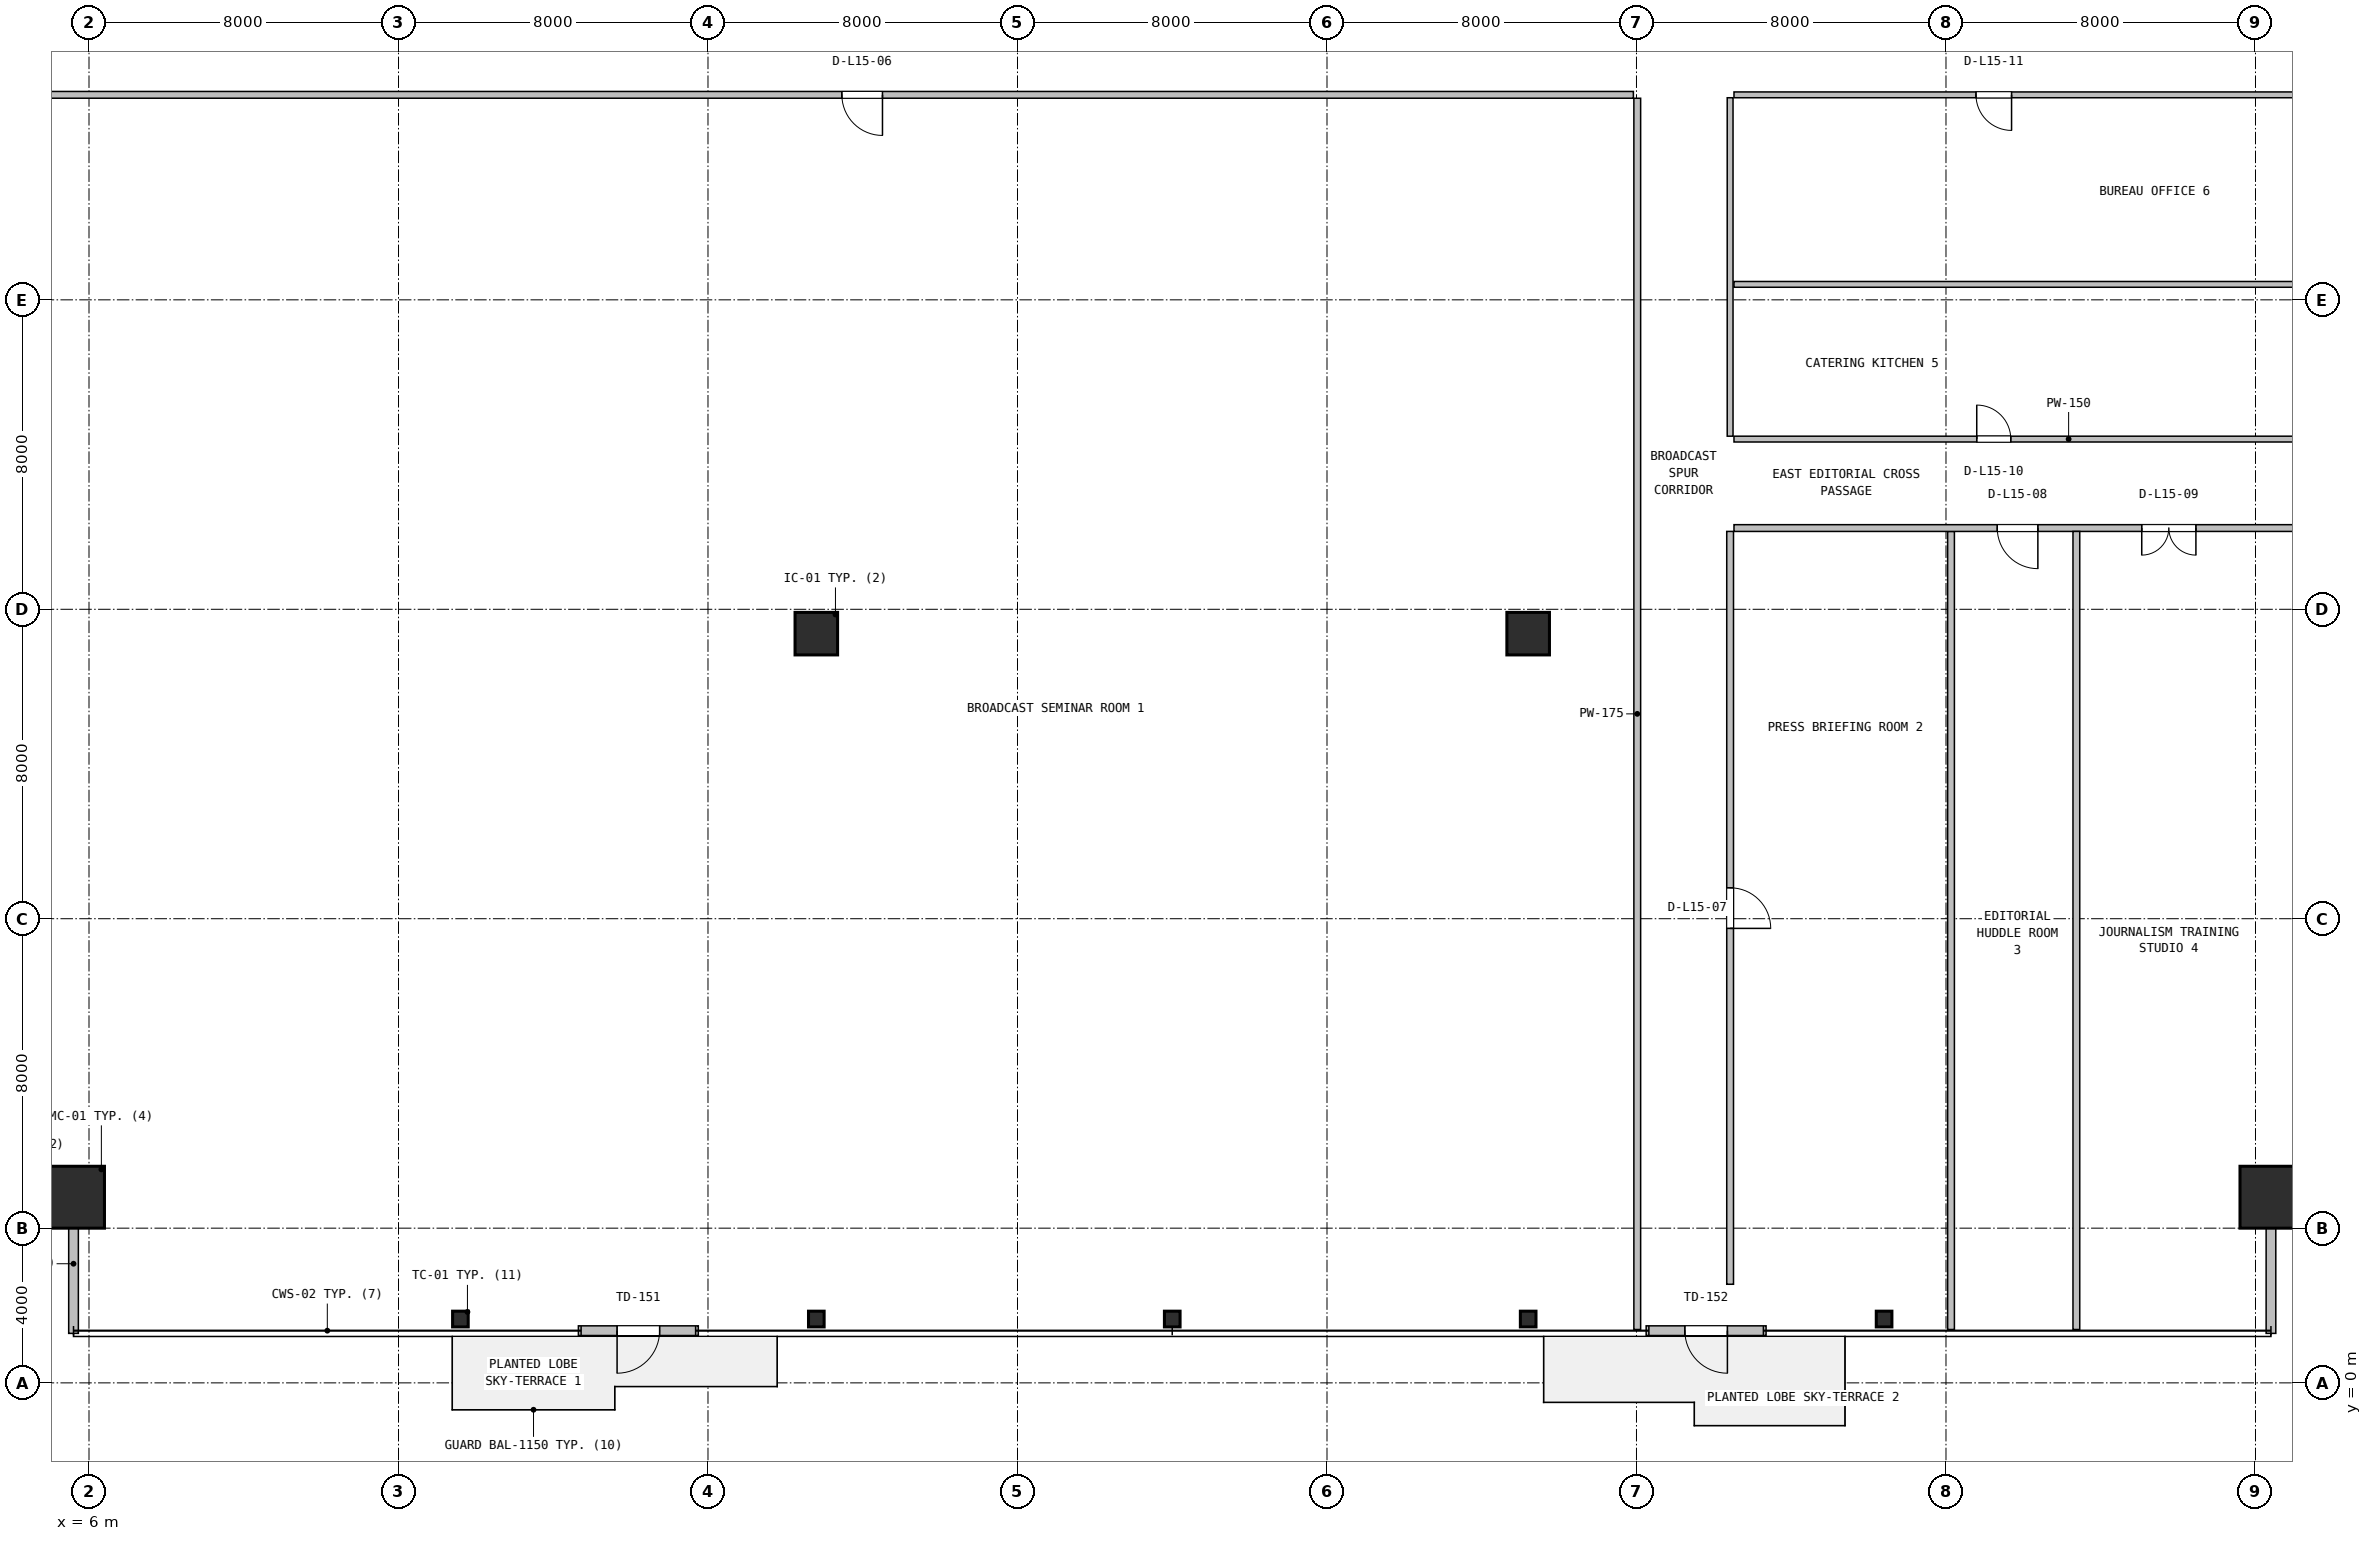
"""IFC4 building model, lengths in metres.
Left out: names, types, materials, properties, quantities, classifications, styles, units other than length and angle.
Written with IfcOpenShell. Run it as: python <this file> out.ifc"""

import sys

from ifc_helpers import new_model, si_unit, direction, frame, frame_2d, origin, origin_2d, place, context, subcontext, project, spatial, rectangle, hollow_rectangle, i_section, extrude, source, transform, mapped, element, fill, save


model = new_model("IFC4")
c1 = context("Model", 3, precision=1e-05, world=origin(), true_north=direction((0.0, 1.0)))
c2 = subcontext(c1, "Body", "Model", "MODEL_VIEW")
j1 = project(units=[si_unit("LENGTHUNIT", "METRE"), si_unit("PLANEANGLEUNIT", "RADIAN")], contexts=[c1])
p1 = place(None, origin())
s1 = spatial("IfcSite", under=j1, at=p1, CompositionType="ELEMENT")
p2 = place(p1, origin())
s2 = spatial("IfcBuilding", under=s1, at=p2, CompositionType="ELEMENT")
p3 = place(p2, frame((0.0, 0.0, 66.6)))
s3 = spatial("IfcBuildingStorey", under=s2, at=p3, CompositionType="ELEMENT", Elevation=66.6)
m1 = source(origin(), c2, "Body", "SweptSolid", [
    extrude(hollow_rectangle(XDim=1.6, YDim=1.6, WallThickness=0.06, at=origin_2d()), origin(), (0.0, 0.0, 1.0), 3.9),
])
for number, where, z_axis, x_axis in (
    (1, (5.6, 4.8, 0.0), (0.0, 0.0, 1.0), (1.0, 0.0, 0.0)),
    (2, (62.4, 4.8, 0.0), (0.0, 0.0, 1.0), (1.0, 0.0, 0.0)),
):
    element("IfcColumn", number, at=place(p3, frame(where, z_axis=z_axis, x_axis=x_axis)), inside=s3, PredefinedType="COLUMN", context=c2, shape_type="MappedRepresentation", body=[
        mapped(m1, transform((0.0, 0.0, 0.0), x_axis=(1.0, 0.0, 0.0), y_axis=(0.0, 1.0, 0.0), z_axis=(0.0, 0.0, 1.0), scale=1.0)),
    ])
m2 = source(origin(), c2, "Body", "SweptSolid", [
    extrude(i_section(OverallWidth=0.404, OverallDepth=0.407, WebThickness=0.027, FlangeThickness=0.044, FilletRadius=0.018, at=origin_2d()), origin(), (0.0, 0.0, 1.0), 3.9),
])
for number, where, z_axis, x_axis in (
    (3, (15.6, 1.65, 0.0), (0.0, 0.0, 1.0), (1.0, 0.0, 0.0)),
    (4, (24.8, 1.65, 0.0), (0.0, 0.0, 1.0), (1.0, 0.0, 0.0)),
    (5, (34.0, 1.65, 0.0), (0.0, 0.0, 1.0), (1.0, 0.0, 0.0)),
    (6, (43.2, 1.65, 0.0), (0.0, 0.0, 1.0), (1.0, 0.0, 0.0)),
    (7, (52.4, 1.65, 0.0), (0.0, 0.0, 1.0), (1.0, 0.0, 0.0)),
):
    element("IfcColumn", number, at=place(p3, frame(where, z_axis=z_axis, x_axis=x_axis)), inside=s3, PredefinedType="COLUMN", context=c2, shape_type="MappedRepresentation", body=[
        mapped(m2, transform((0.0, 0.0, 0.0), x_axis=(1.0, 0.0, 0.0), y_axis=(0.0, 1.0, 0.0), z_axis=(0.0, 0.0, 1.0), scale=1.0)),
    ])
m3 = source(origin(), c2, "Body", "SweptSolid", [
    extrude(rectangle(XDim=1.1, YDim=1.1, at=origin_2d()), origin(), (0.0, 0.0, 1.0), 3.9),
])
for number, where, z_axis, x_axis in (
    (8, (24.8, 19.37, 0.0), (0.0, 0.0, 1.0), (1.0, 0.0, 0.0)),
    (9, (43.2, 19.37, 0.0), (0.0, 0.0, 1.0), (1.0, 0.0, 0.0)),
):
    element("IfcColumn", number, at=place(p3, frame(where, z_axis=z_axis, x_axis=x_axis)), inside=s3, PredefinedType="COLUMN", context=c2, shape_type="MappedRepresentation", body=[
        mapped(m3, transform((0.0, 0.0, 0.0), x_axis=(1.0, 0.0, 0.0), y_axis=(0.0, 1.0, 0.0), z_axis=(0.0, 0.0, 1.0), scale=1.0)),
    ])
p4 = place(p3, frame((18.65, 1.35, 0.0), z_axis=(0.0, 0.0, 1.0), x_axis=(1.0, 0.0, 0.0)))
e10 = element("IfcWall", 10, at=p4, inside=s3, PredefinedType="SOLIDWALL", context=c2, shape_type="SweptSolid", body=[
    extrude(rectangle(XDim=3.1, YDim=0.25, at=frame_2d((1.55, 0.0))), origin(), (0.0, 0.0, 1.0), 3.63),
])
p5 = place(p4, frame((1.0, 0.0, 0.0)))
e11 = element("IfcOpeningElement", 11, at=p5, cuts=e10, PredefinedType="OPENING", context=c2, shape_type="SweptSolid", body=[
    extrude(rectangle(XDim=1.1, YDim=2.15, at=frame_2d((0.55, 1.075))), frame((0.0, 0.135, 0.0), z_axis=(0.0, -1.0, 0.0), x_axis=(1.0, 0.0, 0.0)), (0.0, 0.0, 1.0), 0.27),
])
p6 = place(p3, frame((46.25, 1.35, 0.0), z_axis=(0.0, 0.0, 1.0), x_axis=(1.0, 0.0, 0.0)))
e12 = element("IfcWall", 12, at=p6, inside=s3, PredefinedType="SOLIDWALL", context=c2, shape_type="SweptSolid", body=[
    extrude(rectangle(XDim=3.1, YDim=0.25, at=frame_2d((1.55, 0.0))), origin(), (0.0, 0.0, 1.0), 3.63),
])
p7 = place(p6, frame((1.0, 0.0, 0.0)))
e13 = element("IfcOpeningElement", 13, at=p7, cuts=e12, PredefinedType="OPENING", context=c2, shape_type="SweptSolid", body=[
    extrude(rectangle(XDim=1.1, YDim=2.15, at=frame_2d((0.55, 1.075))), frame((0.0, 0.135, 0.0), z_axis=(0.0, -1.0, 0.0), x_axis=(1.0, 0.0, 0.0)), (0.0, 0.0, 1.0), 0.27),
])
for number, where, z_axis, x_axis in (
    (14, (5.6, 1.28, 0.0), (0.0, 0.0, 1.0), (0.0, 1.0, 0.0)),
    (15, (62.4, 1.28, 0.0), (0.0, 0.0, 1.0), (0.0, 1.0, 0.0)),
):
    element("IfcWall", number, at=place(p3, frame(where, z_axis=z_axis, x_axis=x_axis)), inside=s3, PredefinedType="SOLIDWALL", context=c2, shape_type="SweptSolid", body=[
        extrude(rectangle(XDim=3.6, YDim=0.25, at=frame_2d((1.8, 0.0))), origin(), (0.0, 0.0, 1.0), 3.208),
    ])
p8 = place(p3, frame((46.02, 1.38, 0.0), z_axis=(0.0, 0.0, 1.0), x_axis=(0.0, 1.0, 0.0)))
e16 = element("IfcWall", 16, at=p8, inside=s3, PredefinedType="PARTITIONING", context=c2, shape_type="SweptSolid", body=[
    extrude(rectangle(XDim=31.832, YDim=0.175, at=frame_2d((15.916, 0.0))), origin(), (0.0, 0.0, 1.0), 3.208),
])
p9 = place(p3, frame((2.18, 33.3, 0.0), z_axis=(0.0, 0.0, 1.0), x_axis=(1.0, 0.0, 0.0)))
e17 = element("IfcWall", 17, at=p9, inside=s3, PredefinedType="PARTITIONING", context=c2, shape_type="SweptSolid", body=[
    extrude(rectangle(XDim=43.74, YDim=0.175, at=frame_2d((21.87, 0.0))), origin(), (0.0, 0.0, 1.0), 2.852),
])
p10 = place(p9, frame((23.28, 0.0, 0.0)))
e18 = element("IfcOpeningElement", 18, at=p10, cuts=e17, PredefinedType="OPENING", context=c2, shape_type="SweptSolid", body=[
    extrude(rectangle(XDim=1.05, YDim=2.1, at=frame_2d((0.525, 1.05))), frame((0.0, 0.098, 0.0), z_axis=(0.0, -1.0, 0.0), x_axis=(1.0, 0.0, 0.0)), (0.0, 0.0, 1.0), 0.195),
])
p11 = place(p3, frame((54.13, 1.38, 0.0), z_axis=(0.0, 0.0, 1.0), x_axis=(0.0, 1.0, 0.0)))
e19 = element("IfcWall", 19, at=p11, inside=s3, PredefinedType="PARTITIONING", context=c2, shape_type="SweptSolid", body=[
    extrude(rectangle(XDim=20.633, YDim=0.175, at=frame_2d((10.316, 0.0))), origin(), (0.0, 0.0, 1.0), 3.208),
])
p12 = place(p3, frame((48.52, 22.1, 0.0), z_axis=(0.0, 0.0, 1.0), x_axis=(1.0, 0.0, 0.0)))
e20 = element("IfcWall", 20, at=p12, inside=s3, PredefinedType="PARTITIONING", context=c2, shape_type="SweptSolid", body=[
    extrude(rectangle(XDim=17.3, YDim=0.175, at=frame_2d((8.65, 0.0))), origin(), (0.0, 0.0, 1.0), 3.208),
])
p13 = place(p12, frame((6.805, 0.0, 0.0)))
e21 = element("IfcOpeningElement", 21, at=p13, cuts=e20, PredefinedType="OPENING", context=c2, shape_type="SweptSolid", body=[
    extrude(rectangle(XDim=1.05, YDim=2.1, at=frame_2d((0.525, 1.05))), frame((0.0, 0.098, 0.0), z_axis=(0.0, -1.0, 0.0), x_axis=(1.0, 0.0, 0.0)), (0.0, 0.0, 1.0), 0.195),
])
p14 = place(p12, frame((10.54, 0.0, 0.0)))
e22 = element("IfcOpeningElement", 22, at=p14, cuts=e20, PredefinedType="OPENING", context=c2, shape_type="SweptSolid", body=[
    extrude(rectangle(XDim=1.4, YDim=2.12, at=frame_2d((0.7, 1.06))), frame((0.0, 0.098, 0.0), z_axis=(0.0, -1.0, 0.0), x_axis=(1.0, 0.0, 0.0)), (0.0, 0.0, 1.0), 0.195),
])
p15 = place(p3, frame((48.42, 2.55, 0.0), z_axis=(0.0, 0.0, 1.0), x_axis=(0.0, 1.0, 0.0)))
e23 = element("IfcWall", 23, at=p15, inside=s3, PredefinedType="PARTITIONING", context=c2, shape_type="SweptSolid", body=[
    extrude(rectangle(XDim=19.463, YDim=0.175, at=frame_2d((9.731, 0.0))), origin(), (0.0, 0.0, 1.0), 3.322),
])
p16 = place(p15, frame((9.2, 0.0, 0.0)))
e24 = element("IfcOpeningElement", 24, at=p16, cuts=e23, PredefinedType="OPENING", context=c2, shape_type="SweptSolid", body=[
    extrude(rectangle(XDim=1.05, YDim=2.1, at=frame_2d((0.525, 1.05))), frame((0.0, 0.098, 0.0), z_axis=(0.0, -1.0, 0.0), x_axis=(1.0, 0.0, 0.0)), (0.0, 0.0, 1.0), 0.195),
])
p17 = place(p3, frame((57.37, 1.38, 0.0), z_axis=(0.0, 0.0, 1.0), x_axis=(0.0, 1.0, 0.0)))
e25 = element("IfcWall", 25, at=p17, inside=s3, PredefinedType="PARTITIONING", context=c2, shape_type="SweptSolid", body=[
    extrude(rectangle(XDim=20.633, YDim=0.175, at=frame_2d((10.316, 0.0))), origin(), (0.0, 0.0, 1.0), 3.208),
])
p18 = place(p3, frame((48.52, 24.4, 0.0), z_axis=(0.0, 0.0, 1.0), x_axis=(1.0, 0.0, 0.0)))
e26 = element("IfcWall", 26, at=p18, inside=s3, PredefinedType="PARTITIONING", context=c2, shape_type="SweptSolid", body=[
    extrude(rectangle(XDim=17.3, YDim=0.15, at=frame_2d((8.65, 0.0))), origin(), (0.0, 0.0, 1.0), 3.208),
])
p19 = place(p18, frame((6.275, 0.0, 0.0)))
e27 = element("IfcOpeningElement", 27, at=p19, cuts=e26, PredefinedType="OPENING", context=c2, shape_type="SweptSolid", body=[
    extrude(rectangle(XDim=0.88, YDim=2.06, at=frame_2d((0.44, 1.03))), frame((0.0, 0.085, 0.0), z_axis=(0.0, -1.0, 0.0), x_axis=(1.0, 0.0, 0.0)), (0.0, 0.0, 1.0), 0.17),
])
p20 = place(p3, frame((48.52, 28.4, 0.0), z_axis=(0.0, 0.0, 1.0), x_axis=(1.0, 0.0, 0.0)))
e28 = element("IfcWall", 28, at=p20, inside=s3, PredefinedType="PARTITIONING", context=c2, shape_type="SweptSolid", body=[
    extrude(rectangle(XDim=17.3, YDim=0.15, at=frame_2d((8.65, 0.0))), origin(), (0.0, 0.0, 1.0), 3.208),
])
p21 = place(p3, frame((48.42, 24.475, 0.0), z_axis=(0.0, 0.0, 1.0), x_axis=(0.0, 1.0, 0.0)))
e29 = element("IfcWall", 29, at=p21, inside=s3, PredefinedType="PARTITIONING", context=c2, shape_type="SweptSolid", body=[
    extrude(rectangle(XDim=8.75, YDim=0.15, at=frame_2d((4.375, 0.0))), origin(), (0.0, 0.0, 1.0), 3.378),
])
p22 = place(p3, frame((48.52, 33.3, 0.0), z_axis=(0.0, 0.0, 1.0), x_axis=(1.0, 0.0, 0.0)))
e30 = element("IfcWall", 30, at=p22, inside=s3, PredefinedType="PARTITIONING", context=c2, shape_type="SweptSolid", body=[
    extrude(rectangle(XDim=17.3, YDim=0.15, at=frame_2d((8.65, 0.0))), origin(), (0.0, 0.0, 1.0), 3.208),
])
p23 = place(p22, frame((6.255, 0.0, 0.0)))
e31 = element("IfcOpeningElement", 31, at=p23, cuts=e30, PredefinedType="OPENING", context=c2, shape_type="SweptSolid", body=[
    extrude(rectangle(XDim=0.92, YDim=2.08, at=frame_2d((0.46, 1.04))), frame((0.0, 0.085, 0.0), z_axis=(0.0, -1.0, 0.0), x_axis=(1.0, 0.0, 0.0)), (0.0, 0.0, 1.0), 0.17),
])
m4 = source(origin(), c2, "Body", "SweptSolid", [
    extrude(rectangle(XDim=1.1, YDim=2.15, at=frame_2d((0.55, 1.075))), frame((0.0, 0.025, 0.0), z_axis=(0.0, -1.0, 0.0), x_axis=(1.0, 0.0, 0.0)), (0.0, 0.0, 1.0), 0.05),
])
p24 = place(p5, frame((1.1, 0.0, 0.0), z_axis=(0.0, 0.0, 1.0), x_axis=(-1.0, 0.0, 0.0)))
e32 = element("IfcDoor", 32, at=p24, inside=s3, OperationType="SINGLE_SWING_LEFT", PredefinedType="DOOR", context=c2, shape_type="MappedRepresentation", body=[
    mapped(m4, transform((0.0, 0.0, 0.0), x_axis=(1.0, 0.0, 0.0), y_axis=(0.0, 1.0, 0.0), z_axis=(0.0, 0.0, 1.0), scale=1.0)),
])
fill(e11, e32)
p25 = place(p7, frame((1.1, 0.0, 0.0), z_axis=(0.0, 0.0, 1.0), x_axis=(-1.0, 0.0, 0.0)))
e33 = element("IfcDoor", 33, at=p25, inside=s3, OperationType="SINGLE_SWING_RIGHT", PredefinedType="DOOR", context=c2, shape_type="MappedRepresentation", body=[
    mapped(m4, transform((0.0, 0.0, 0.0), x_axis=(1.0, 0.0, 0.0), y_axis=(0.0, 1.0, 0.0), z_axis=(0.0, 0.0, 1.0), scale=1.0)),
])
fill(e13, e33)
m5 = source(origin(), c2, "Body", "SweptSolid", [
    extrude(rectangle(XDim=1.05, YDim=2.1, at=frame_2d((0.525, 1.05))), frame((0.0, 0.025, 0.0), z_axis=(0.0, -1.0, 0.0), x_axis=(1.0, 0.0, 0.0)), (0.0, 0.0, 1.0), 0.05),
])
p26 = place(p10, frame((1.05, 0.0, 0.0), z_axis=(0.0, 0.0, 1.0), x_axis=(-1.0, 0.0, 0.0)))
e34 = element("IfcDoor", 34, at=p26, inside=s3, OperationType="SINGLE_SWING_RIGHT", PredefinedType="DOOR", context=c2, shape_type="MappedRepresentation", body=[
    mapped(m5, transform((0.0, 0.0, 0.0), x_axis=(1.0, 0.0, 0.0), y_axis=(0.0, 1.0, 0.0), z_axis=(0.0, 0.0, 1.0), scale=1.0)),
])
fill(e18, e34)
p27 = place(p16, frame((1.05, 0.0, 0.0), z_axis=(0.0, 0.0, 1.0), x_axis=(-1.0, 0.0, 0.0)))
e35 = element("IfcDoor", 35, at=p27, inside=s3, OperationType="SINGLE_SWING_LEFT", PredefinedType="DOOR", context=c2, shape_type="MappedRepresentation", body=[
    mapped(m5, transform((0.0, 0.0, 0.0), x_axis=(1.0, 0.0, 0.0), y_axis=(0.0, 1.0, 0.0), z_axis=(0.0, 0.0, 1.0), scale=1.0)),
])
fill(e24, e35)
p28 = place(p13, frame((1.05, 0.0, 0.0), z_axis=(0.0, 0.0, 1.0), x_axis=(-1.0, 0.0, 0.0)))
e36 = element("IfcDoor", 36, at=p28, inside=s3, OperationType="SINGLE_SWING_RIGHT", PredefinedType="DOOR", context=c2, shape_type="MappedRepresentation", body=[
    mapped(m5, transform((0.0, 0.0, 0.0), x_axis=(1.0, 0.0, 0.0), y_axis=(0.0, 1.0, 0.0), z_axis=(0.0, 0.0, 1.0), scale=1.0)),
])
fill(e21, e36)
m6 = source(origin(), c2, "Body", "SweptSolid", [
    extrude(rectangle(XDim=1.4, YDim=2.12, at=frame_2d((0.7, 1.06))), frame((0.0, 0.025, 0.0), z_axis=(0.0, -1.0, 0.0), x_axis=(1.0, 0.0, 0.0)), (0.0, 0.0, 1.0), 0.05),
])
p29 = place(p14, frame((1.4, 0.0, 0.0), z_axis=(0.0, 0.0, 1.0), x_axis=(-1.0, 0.0, 0.0)))
e37 = element("IfcDoor", 37, at=p29, inside=s3, OperationType="DOUBLE_DOOR_SINGLE_SWING", PredefinedType="DOOR", context=c2, shape_type="MappedRepresentation", body=[
    mapped(m6, transform((0.0, 0.0, 0.0), x_axis=(1.0, 0.0, 0.0), y_axis=(0.0, 1.0, 0.0), z_axis=(0.0, 0.0, 1.0), scale=1.0)),
])
fill(e22, e37)
m7 = source(origin(), c2, "Body", "SweptSolid", [
    extrude(rectangle(XDim=0.88, YDim=2.06, at=frame_2d((0.44, 1.03))), frame((0.0, 0.025, 0.0), z_axis=(0.0, -1.0, 0.0), x_axis=(1.0, 0.0, 0.0)), (0.0, 0.0, 1.0), 0.05),
])
p30 = place(p19, origin())
e38 = element("IfcDoor", 38, at=p30, inside=s3, OperationType="SINGLE_SWING_LEFT", PredefinedType="DOOR", context=c2, shape_type="MappedRepresentation", body=[
    mapped(m7, transform((0.0, 0.0, 0.0), x_axis=(1.0, 0.0, 0.0), y_axis=(0.0, 1.0, 0.0), z_axis=(0.0, 0.0, 1.0), scale=1.0)),
])
fill(e27, e38)
m8 = source(origin(), c2, "Body", "SweptSolid", [
    extrude(rectangle(XDim=0.92, YDim=2.08, at=frame_2d((0.46, 1.04))), frame((0.0, 0.025, 0.0), z_axis=(0.0, -1.0, 0.0), x_axis=(1.0, 0.0, 0.0)), (0.0, 0.0, 1.0), 0.05),
])
p31 = place(p23, frame((0.92, 0.0, 0.0), z_axis=(0.0, 0.0, 1.0), x_axis=(-1.0, 0.0, 0.0)))
e39 = element("IfcDoor", 39, at=p31, inside=s3, OperationType="SINGLE_SWING_RIGHT", PredefinedType="DOOR", context=c2, shape_type="MappedRepresentation", body=[
    mapped(m8, transform((0.0, 0.0, 0.0), x_axis=(1.0, 0.0, 0.0), y_axis=(0.0, 1.0, 0.0), z_axis=(0.0, 0.0, 1.0), scale=1.0)),
])
fill(e31, e39)
save(model, sys.argv[1])
